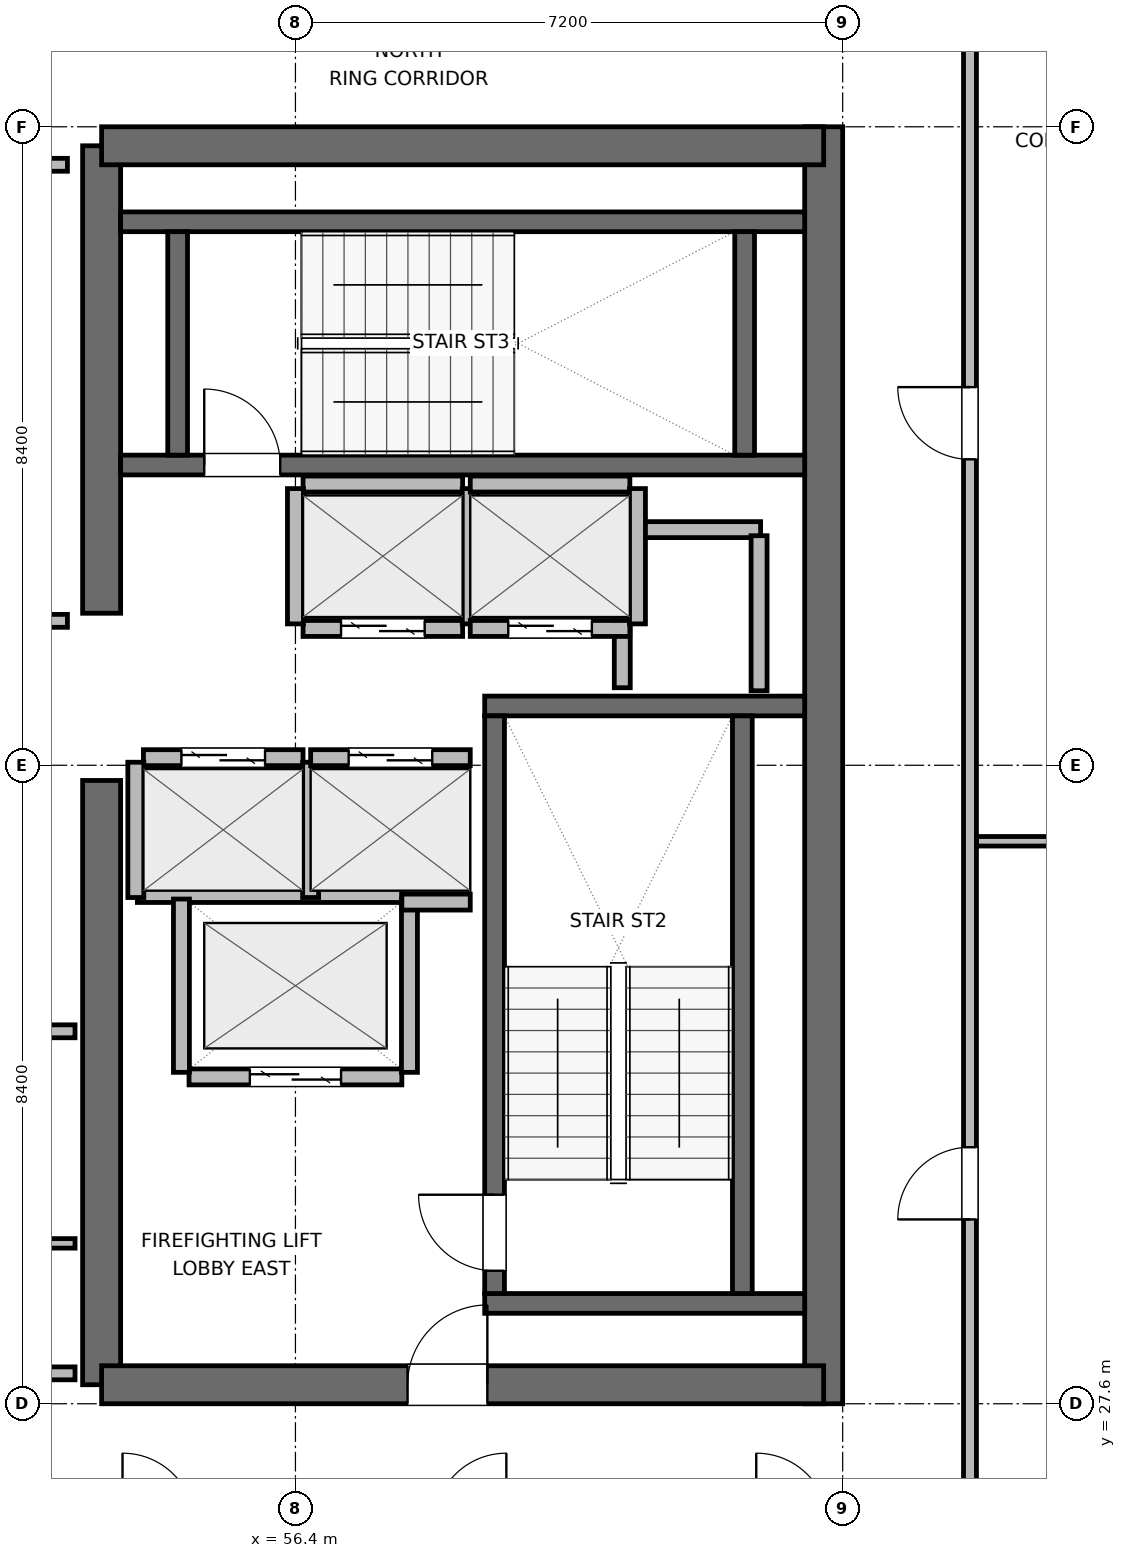
"""IFC4 building model, lengths in metres.
Left out: names, types, materials, properties, quantities, classifications, styles, units other than length and angle.
Written with IfcOpenShell. Run it as: python <this file> out.ifc"""

import sys

from ifc_helpers import new_model, si_unit, direction, frame, frame_2d, origin, place, context, subcontext, project, spatial, rectangle, extrude, element, fill, save


model = new_model("IFC4")
c1 = context("Model", 3, precision=1e-05, world=origin(), true_north=direction((0.0, 1.0)))
c2 = subcontext(c1, "Body", "Model", "MODEL_VIEW")
j1 = project(units=[si_unit("LENGTHUNIT", "METRE"), si_unit("PLANEANGLEUNIT", "RADIAN")], contexts=[c1])
p1 = place(None, origin())
s1 = spatial("IfcSite", under=j1, at=p1, CompositionType="ELEMENT")
p2 = place(p1, origin())
s2 = spatial("IfcBuilding", under=s1, at=p2, CompositionType="ELEMENT")
p3 = place(p2, frame((0.0, 0.0, 314.1)))
s3 = spatial("IfcBuildingStorey", under=s2, at=p3, CompositionType="ELEMENT", Elevation=314.1)
p4 = place(p3, frame((53.85, 27.85, 0.0), z_axis=(0.0, 0.0, 1.0), x_axis=(0.0, 1.0, 0.0)))
e1 = element("IfcWall", 1, at=p4, inside=s3, PredefinedType="SHEAR", context=c2, shape_type="SweptSolid", body=[
    extrude(rectangle(XDim=7.95, YDim=0.5, at=frame_2d((3.975, 0.0))), origin(), (0.0, 0.0, 1.0), 3.9),
])
p5 = place(p3, frame((53.85, 38.0, 0.0), z_axis=(0.0, 0.0, 1.0), x_axis=(0.0, 1.0, 0.0)))
e2 = element("IfcWall", 2, at=p5, inside=s3, PredefinedType="SHEAR", context=c2, shape_type="SweptSolid", body=[
    extrude(rectangle(XDim=6.15, YDim=0.5, at=frame_2d((3.075, 0.0))), origin(), (0.0, 0.0, 1.0), 3.9),
])
p6 = place(p3, frame((63.35, 27.6, 0.0), z_axis=(0.0, 0.0, 1.0), x_axis=(0.0, 1.0, 0.0)))
e3 = element("IfcWall", 3, at=p6, inside=s3, PredefinedType="SHEAR", context=c2, shape_type="SweptSolid", body=[
    extrude(rectangle(XDim=16.8, YDim=0.5, at=frame_2d((8.4, 0.0))), origin(), (0.0, 0.0, 1.0), 3.9),
])
p7 = place(p3, frame((53.85, 27.85, 0.0), z_axis=(0.0, 0.0, 1.0), x_axis=(1.0, 0.0, 0.0)))
e4 = element("IfcWall", 4, at=p7, inside=s3, PredefinedType="SHEAR", context=c2, shape_type="SweptSolid", body=[
    extrude(rectangle(XDim=9.5, YDim=0.5, at=frame_2d((4.75, 0.0))), origin(), (0.0, 0.0, 1.0), 3.9),
])
p8 = place(p7, frame((4.025, 0.0, 0.0)))
e5 = element("IfcOpeningElement", 5, at=p8, cuts=e4, PredefinedType="OPENING", context=c2, shape_type="SweptSolid", body=[
    extrude(rectangle(XDim=1.05, YDim=2.04, at=frame_2d((0.525, 1.02))), frame((0.0, 0.26, 0.0), z_axis=(0.0, -1.0, 0.0), x_axis=(1.0, 0.0, 0.0)), (0.0, 0.0, 1.0), 0.52),
])
p9 = place(p3, frame((53.85, 44.15, 0.0), z_axis=(0.0, 0.0, 1.0), x_axis=(1.0, 0.0, 0.0)))
e6 = element("IfcWall", 6, at=p9, inside=s3, PredefinedType="SHEAR", context=c2, shape_type="SweptSolid", body=[
    extrude(rectangle(XDim=9.5, YDim=0.5, at=frame_2d((4.75, 0.0))), origin(), (0.0, 0.0, 1.0), 3.9),
])
for number, where, z_axis, x_axis in (
    (7, (58.89, 28.92, 0.0), (0.0, 0.0, 1.0), (1.0, 0.0, 0.0)),
    (8, (58.89, 36.78, 0.0), (0.0, 0.0, 1.0), (1.0, 0.0, 0.0)),
):
    element("IfcWall", number, at=place(p3, frame(where, z_axis=z_axis, x_axis=x_axis)), inside=s3, PredefinedType="SHEAR", context=c2, shape_type="SweptSolid", body=[
        extrude(rectangle(XDim=4.21, YDim=0.26, at=frame_2d((2.105, 0.0))), origin(), (0.0, 0.0, 1.0), 3.9),
    ])
p10 = place(p3, frame((59.02, 29.05, 0.0), z_axis=(0.0, 0.0, 1.0), x_axis=(0.0, 1.0, 0.0)))
e9 = element("IfcWall", 9, at=p10, inside=s3, PredefinedType="SHEAR", context=c2, shape_type="SweptSolid", body=[
    extrude(rectangle(XDim=7.6, YDim=0.26, at=frame_2d((3.8, 0.0))), origin(), (0.0, 0.0, 1.0), 3.9),
])
p11 = place(p10, frame((0.3, 0.0, 0.0)))
e10 = element("IfcOpeningElement", 10, at=p11, cuts=e9, PredefinedType="OPENING", context=c2, shape_type="SweptSolid", body=[
    extrude(rectangle(XDim=1.0, YDim=2.04, at=frame_2d((0.5, 1.02))), frame((0.0, 0.14, 0.0), z_axis=(0.0, -1.0, 0.0), x_axis=(1.0, 0.0, 0.0)), (0.0, 0.0, 1.0), 0.28),
])
p12 = place(p3, frame((62.28, 29.05, 0.0), z_axis=(0.0, 0.0, 1.0), x_axis=(0.0, 1.0, 0.0)))
e11 = element("IfcWall", 11, at=p12, inside=s3, PredefinedType="SHEAR", context=c2, shape_type="SweptSolid", body=[
    extrude(rectangle(XDim=7.6, YDim=0.26, at=frame_2d((3.8, 0.0))), origin(), (0.0, 0.0, 1.0), 3.9),
])
p13 = place(p3, frame((54.1, 39.95, 0.0), z_axis=(0.0, 0.0, 1.0), x_axis=(1.0, 0.0, 0.0)))
e12 = element("IfcWall", 12, at=p13, inside=s3, PredefinedType="SHEAR", context=c2, shape_type="SweptSolid", body=[
    extrude(rectangle(XDim=9.0, YDim=0.26, at=frame_2d((4.5, 0.0))), origin(), (0.0, 0.0, 1.0), 3.9),
])
p14 = place(p13, frame((1.1, 0.0, 0.0)))
e13 = element("IfcOpeningElement", 13, at=p14, cuts=e12, PredefinedType="OPENING", context=c2, shape_type="SweptSolid", body=[
    extrude(rectangle(XDim=1.0, YDim=2.04, at=frame_2d((0.5, 1.02))), frame((0.0, 0.14, 0.0), z_axis=(0.0, -1.0, 0.0), x_axis=(1.0, 0.0, 0.0)), (0.0, 0.0, 1.0), 0.28),
])
p15 = place(p3, frame((54.1, 43.15, 0.0), z_axis=(0.0, 0.0, 1.0), x_axis=(1.0, 0.0, 0.0)))
e14 = element("IfcWall", 14, at=p15, inside=s3, PredefinedType="SHEAR", context=c2, shape_type="SweptSolid", body=[
    extrude(rectangle(XDim=9.0, YDim=0.26, at=frame_2d((4.5, 0.0))), origin(), (0.0, 0.0, 1.0), 3.9),
])
for number, where, z_axis, x_axis in (
    (15, (54.85, 40.08, 0.0), (0.0, 0.0, 1.0), (0.0, 1.0, 0.0)),
    (16, (62.31, 40.08, 0.0), (0.0, 0.0, 1.0), (0.0, 1.0, 0.0)),
):
    element("IfcWall", number, at=place(p3, frame(where, z_axis=z_axis, x_axis=x_axis)), inside=s3, PredefinedType="SHEAR", context=c2, shape_type="SweptSolid", body=[
        extrude(rectangle(XDim=2.94, YDim=0.26, at=frame_2d((1.47, 0.0))), origin(), (0.0, 0.0, 1.0), 3.9),
    ])
p16 = place(p3, frame((60.72, 39.1, 0.0), z_axis=(0.0, 0.0, 1.0), x_axis=(1.0, 0.0, 0.0)))
e17 = element("IfcWall", 17, at=p16, inside=s3, PredefinedType="PARTITIONING", context=c2, shape_type="SweptSolid", body=[
    extrude(rectangle(XDim=1.8, YDim=0.21, at=frame_2d((0.9, 0.0))), origin(), (0.0, 0.0, 1.0), 3.68),
])
p17 = place(p3, frame((60.7, 37.02, 0.0), z_axis=(0.0, 0.0, 1.0), x_axis=(0.0, 1.0, 0.0)))
e18 = element("IfcWall", 18, at=p17, inside=s3, PredefinedType="PARTITIONING", context=c2, shape_type="SweptSolid", body=[
    extrude(rectangle(XDim=1.96, YDim=0.21, at=frame_2d((0.98, 0.0))), origin(), (0.0, 0.0, 1.0), 3.68),
])
p18 = place(p3, frame((62.5, 36.98, 0.0), z_axis=(0.0, 0.0, 1.0), x_axis=(0.0, 1.0, 0.0)))
e19 = element("IfcWall", 19, at=p18, inside=s3, PredefinedType="PARTITIONING", context=c2, shape_type="SweptSolid", body=[
    extrude(rectangle(XDim=2.04, YDim=0.21, at=frame_2d((1.02, 0.0))), origin(), (0.0, 0.0, 1.0), 3.68),
])
p19 = place(p3, frame((55.0, 31.9, 0.0), z_axis=(0.0, 0.0, 1.0), x_axis=(1.0, 0.0, 0.0)))
e20 = element("IfcWall", 20, at=p19, inside=s3, PredefinedType="PARTITIONING", context=c2, shape_type="SweptSolid", body=[
    extrude(rectangle(XDim=2.8, YDim=0.21, at=frame_2d((1.4, 0.0))), origin(), (0.0, 0.0, 1.0), 3.68),
])
p20 = place(p19, frame((0.8, 0.0, 0.0)))
e21 = element("IfcOpeningElement", 21, at=p20, cuts=e20, PredefinedType="OPENING", context=c2, shape_type="SweptSolid", body=[
    extrude(rectangle(XDim=1.2, YDim=2.04, at=frame_2d((0.6, 1.02))), frame((0.0, 0.115, 0.0), z_axis=(0.0, -1.0, 0.0), x_axis=(1.0, 0.0, 0.0)), (0.0, 0.0, 1.0), 0.23),
])
p21 = place(p3, frame((54.32, 34.3, 0.0), z_axis=(0.0, 0.0, 1.0), x_axis=(1.0, 0.0, 0.0)))
e22 = element("IfcWall", 22, at=p21, inside=s3, PredefinedType="PARTITIONING", context=c2, shape_type="SweptSolid", body=[
    extrude(rectangle(XDim=3.48, YDim=0.21, at=frame_2d((1.74, 0.0))), origin(), (0.0, 0.0, 1.0), 3.68),
])
for number, where, z_axis, x_axis in (
    (23, (54.9, 31.96, 0.0), (0.0, 0.0, 1.0), (0.0, 1.0, 0.0)),
    (24, (57.9, 31.96, 0.0), (0.0, 0.0, 1.0), (0.0, 1.0, 0.0)),
):
    element("IfcWall", number, at=place(p3, frame(where, z_axis=z_axis, x_axis=x_axis)), inside=s3, PredefinedType="PARTITIONING", context=c2, shape_type="SweptSolid", body=[
        extrude(rectangle(XDim=2.28, YDim=0.21, at=frame_2d((1.14, 0.0))), origin(), (0.0, 0.0, 1.0), 3.68),
    ])
p22 = place(p3, frame((54.4, 36.1, 0.0), z_axis=(0.0, 0.0, 1.0), x_axis=(1.0, 0.0, 0.0)))
e25 = element("IfcWall", 25, at=p22, inside=s3, PredefinedType="PARTITIONING", context=c2, shape_type="SweptSolid", body=[
    extrude(rectangle(XDim=2.1, YDim=0.21, at=frame_2d((1.05, 0.0))), origin(), (0.0, 0.0, 1.0), 3.68),
])
p23 = place(p22, frame((0.5, 0.0, 0.0)))
e26 = element("IfcOpeningElement", 26, at=p23, cuts=e25, PredefinedType="OPENING", context=c2, shape_type="SweptSolid", body=[
    extrude(rectangle(XDim=1.1, YDim=2.04, at=frame_2d((0.55, 1.02))), frame((0.0, 0.115, 0.0), z_axis=(0.0, -1.0, 0.0), x_axis=(1.0, 0.0, 0.0)), (0.0, 0.0, 1.0), 0.23),
])
for number, where, z_axis, x_axis in (
    (27, (54.3, 34.26, 0.0), (0.0, 0.0, 1.0), (0.0, 1.0, 0.0)),
    (28, (56.6, 34.26, 0.0), (0.0, 0.0, 1.0), (0.0, 1.0, 0.0)),
):
    element("IfcWall", number, at=place(p3, frame(where, z_axis=z_axis, x_axis=x_axis)), inside=s3, PredefinedType="PARTITIONING", context=c2, shape_type="SweptSolid", body=[
        extrude(rectangle(XDim=1.78, YDim=0.21, at=frame_2d((0.89, 0.0))), origin(), (0.0, 0.0, 1.0), 3.68),
    ])
p24 = place(p3, frame((56.6, 36.1, 0.0), z_axis=(0.0, 0.0, 1.0), x_axis=(1.0, 0.0, 0.0)))
e29 = element("IfcWall", 29, at=p24, inside=s3, PredefinedType="PARTITIONING", context=c2, shape_type="SweptSolid", body=[
    extrude(rectangle(XDim=2.1, YDim=0.21, at=frame_2d((1.05, 0.0))), origin(), (0.0, 0.0, 1.0), 3.68),
])
p25 = place(p24, frame((0.5, 0.0, 0.0)))
e30 = element("IfcOpeningElement", 30, at=p25, cuts=e29, PredefinedType="OPENING", context=c2, shape_type="SweptSolid", body=[
    extrude(rectangle(XDim=1.1, YDim=2.04, at=frame_2d((0.55, 1.02))), frame((0.0, 0.115, 0.0), z_axis=(0.0, -1.0, 0.0), x_axis=(1.0, 0.0, 0.0)), (0.0, 0.0, 1.0), 0.23),
])
p26 = place(p3, frame((57.8, 34.2, 0.0), z_axis=(0.0, 0.0, 1.0), x_axis=(1.0, 0.0, 0.0)))
e31 = element("IfcWall", 31, at=p26, inside=s3, PredefinedType="PARTITIONING", context=c2, shape_type="SweptSolid", body=[
    extrude(rectangle(XDim=0.9, YDim=0.21, at=frame_2d((0.45, 0.0))), origin(), (0.0, 0.0, 1.0), 3.68),
])
p27 = place(p3, frame((56.5, 37.8, 0.0), z_axis=(0.0, 0.0, 1.0), x_axis=(1.0, 0.0, 0.0)))
e32 = element("IfcWall", 32, at=p27, inside=s3, PredefinedType="PARTITIONING", context=c2, shape_type="SweptSolid", body=[
    extrude(rectangle(XDim=2.1, YDim=0.21, at=frame_2d((1.05, 0.0))), origin(), (0.0, 0.0, 1.0), 3.68),
])
p28 = place(p27, frame((0.5, 0.0, 0.0)))
e33 = element("IfcOpeningElement", 33, at=p28, cuts=e32, PredefinedType="OPENING", context=c2, shape_type="SweptSolid", body=[
    extrude(rectangle(XDim=1.1, YDim=2.04, at=frame_2d((0.55, 1.02))), frame((0.0, 0.115, 0.0), z_axis=(0.0, -1.0, 0.0), x_axis=(1.0, 0.0, 0.0)), (0.0, 0.0, 1.0), 0.23),
])
p29 = place(p3, frame((56.5, 39.7, 0.0), z_axis=(0.0, 0.0, 1.0), x_axis=(1.0, 0.0, 0.0)))
e34 = element("IfcWall", 34, at=p29, inside=s3, PredefinedType="PARTITIONING", context=c2, shape_type="SweptSolid", body=[
    extrude(rectangle(XDim=2.1, YDim=0.21, at=frame_2d((1.05, 0.0))), origin(), (0.0, 0.0, 1.0), 3.68),
])
for number, where, z_axis, x_axis in (
    (35, (56.4, 37.86, 0.0), (0.0, 0.0, 1.0), (0.0, 1.0, 0.0)),
    (36, (58.7, 37.86, 0.0), (0.0, 0.0, 1.0), (0.0, 1.0, 0.0)),
):
    element("IfcWall", number, at=place(p3, frame(where, z_axis=z_axis, x_axis=x_axis)), inside=s3, PredefinedType="PARTITIONING", context=c2, shape_type="SweptSolid", body=[
        extrude(rectangle(XDim=1.78, YDim=0.21, at=frame_2d((0.89, 0.0))), origin(), (0.0, 0.0, 1.0), 3.68),
    ])
p30 = place(p3, frame((58.7, 37.8, 0.0), z_axis=(0.0, 0.0, 1.0), x_axis=(1.0, 0.0, 0.0)))
e37 = element("IfcWall", 37, at=p30, inside=s3, PredefinedType="PARTITIONING", context=c2, shape_type="SweptSolid", body=[
    extrude(rectangle(XDim=2.1, YDim=0.21, at=frame_2d((1.05, 0.0))), origin(), (0.0, 0.0, 1.0), 3.68),
])
p31 = place(p30, frame((0.5, 0.0, 0.0)))
e38 = element("IfcOpeningElement", 38, at=p31, cuts=e37, PredefinedType="OPENING", context=c2, shape_type="SweptSolid", body=[
    extrude(rectangle(XDim=1.1, YDim=2.04, at=frame_2d((0.55, 1.02))), frame((0.0, 0.115, 0.0), z_axis=(0.0, -1.0, 0.0), x_axis=(1.0, 0.0, 0.0)), (0.0, 0.0, 1.0), 0.23),
])
p32 = place(p3, frame((58.7, 39.7, 0.0), z_axis=(0.0, 0.0, 1.0), x_axis=(1.0, 0.0, 0.0)))
e39 = element("IfcWall", 39, at=p32, inside=s3, PredefinedType="PARTITIONING", context=c2, shape_type="SweptSolid", body=[
    extrude(rectangle(XDim=2.1, YDim=0.21, at=frame_2d((1.05, 0.0))), origin(), (0.0, 0.0, 1.0), 3.68),
])
p33 = place(p3, frame((60.9, 37.86, 0.0), z_axis=(0.0, 0.0, 1.0), x_axis=(0.0, 1.0, 0.0)))
e40 = element("IfcWall", 40, at=p33, inside=s3, PredefinedType="PARTITIONING", context=c2, shape_type="SweptSolid", body=[
    extrude(rectangle(XDim=1.78, YDim=0.21, at=frame_2d((0.89, 0.0))), origin(), (0.0, 0.0, 1.0), 3.68),
])
p34 = place(p3, frame((49.287, 28.0, 0.0), z_axis=(0.0, 0.0, 1.0), x_axis=(1.0, 0.0, 0.0)))
e41 = element("IfcWall", 41, at=p34, inside=s3, PredefinedType="PARTITIONING", context=c2, shape_type="SweptSolid", body=[
    extrude(rectangle(XDim=4.213, YDim=0.17, at=frame_2d((2.106, 0.0))), origin(), (0.0, 0.0, 1.0), 2.765),
])
p35 = place(p3, frame((52.2, 32.5, 0.0), z_axis=(0.0, 0.0, 1.0), x_axis=(1.0, 0.0, 0.0)))
e42 = element("IfcWall", 42, at=p35, inside=s3, PredefinedType="PARTITIONING", context=c2, shape_type="SweptSolid", body=[
    extrude(rectangle(XDim=1.3, YDim=0.17, at=frame_2d((0.65, 0.0))), origin(), (0.0, 0.0, 1.0), 3.68),
])
p36 = place(p3, frame((49.287, 29.71, 0.0), z_axis=(0.0, 0.0, 1.0), x_axis=(1.0, 0.0, 0.0)))
e43 = element("IfcWall", 43, at=p36, inside=s3, PredefinedType="PARTITIONING", context=c2, shape_type="SweptSolid", body=[
    extrude(rectangle(XDim=4.213, YDim=0.125, at=frame_2d((2.106, 0.0))), origin(), (0.0, 0.0, 1.0), 3.68),
])
p37 = place(p3, frame((49.287, 37.9, 0.0), z_axis=(0.0, 0.0, 1.0), x_axis=(1.0, 0.0, 0.0)))
e44 = element("IfcWall", 44, at=p37, inside=s3, PredefinedType="PARTITIONING", context=c2, shape_type="SweptSolid", body=[
    extrude(rectangle(XDim=4.113, YDim=0.17, at=frame_2d((2.056, 0.0))), origin(), (0.0, 0.0, 1.0), 3.68),
])
p38 = place(p3, frame((49.287, 43.9, 0.0), z_axis=(0.0, 0.0, 1.0), x_axis=(1.0, 0.0, 0.0)))
e45 = element("IfcWall", 45, at=p38, inside=s3, PredefinedType="PARTITIONING", context=c2, shape_type="SweptSolid", body=[
    extrude(rectangle(XDim=4.113, YDim=0.17, at=frame_2d((2.056, 0.0))), origin(), (0.0, 0.0, 1.0), 2.765),
])
p39 = place(p3, frame((65.275, 26.087, 0.0), z_axis=(0.0, 0.0, 1.0), x_axis=(0.0, 1.0, 0.0)))
e46 = element("IfcWall", 46, at=p39, inside=s3, PredefinedType="PARTITIONING", context=c2, shape_type="SweptSolid", body=[
    extrude(rectangle(XDim=19.826, YDim=0.17, at=frame_2d((9.913, 0.0))), origin(), (0.0, 0.0, 1.0), 3.68),
])
p40 = place(p39, frame((3.938, 0.0, 0.0)))
e47 = element("IfcOpeningElement", 47, at=p40, cuts=e46, PredefinedType="OPENING", context=c2, shape_type="SweptSolid", body=[
    extrude(rectangle(XDim=0.95, YDim=2.04, at=frame_2d((0.475, 1.02))), frame((0.0, 0.095, 0.0), z_axis=(0.0, -1.0, 0.0), x_axis=(1.0, 0.0, 0.0)), (0.0, 0.0, 1.0), 0.19),
])
p41 = place(p39, frame((13.938, 0.0, 0.0)))
e48 = element("IfcOpeningElement", 48, at=p41, cuts=e46, PredefinedType="OPENING", context=c2, shape_type="SweptSolid", body=[
    extrude(rectangle(XDim=0.95, YDim=2.04, at=frame_2d((0.475, 1.02))), frame((0.0, 0.095, 0.0), z_axis=(0.0, -1.0, 0.0), x_axis=(1.0, 0.0, 0.0)), (0.0, 0.0, 1.0), 0.19),
])
p42 = place(p3, frame((65.362, 35.0, 0.0), z_axis=(0.0, 0.0, 1.0), x_axis=(1.0, 0.0, 0.0)))
e49 = element("IfcWall", 49, at=p42, inside=s3, PredefinedType="PARTITIONING", context=c2, shape_type="SweptSolid", body=[
    extrude(rectangle(XDim=5.163, YDim=0.125, at=frame_2d((2.582, 0.0))), origin(), (0.0, 0.0, 1.0), 3.68),
])
p43 = place(p11, origin())
e50 = element("IfcDoor", 50, at=p43, inside=s3, OperationType="SINGLE_SWING_RIGHT", PredefinedType="DOOR", context=c2, shape_type="SweptSolid", body=[
    extrude(rectangle(XDim=1.0, YDim=2.04, at=frame_2d((0.5, 1.02))), frame((0.0, 0.025, 0.0), z_axis=(0.0, -1.0, 0.0), x_axis=(1.0, 0.0, 0.0)), (0.0, 0.0, 1.0), 0.05),
])
fill(e10, e50)
p44 = place(p14, origin())
e51 = element("IfcDoor", 51, at=p44, inside=s3, OperationType="SINGLE_SWING_LEFT", PredefinedType="DOOR", context=c2, shape_type="SweptSolid", body=[
    extrude(rectangle(XDim=1.0, YDim=2.04, at=frame_2d((0.5, 1.02))), frame((0.0, 0.025, 0.0), z_axis=(0.0, -1.0, 0.0), x_axis=(1.0, 0.0, 0.0)), (0.0, 0.0, 1.0), 0.05),
])
fill(e13, e51)
p45 = place(p20, origin())
e52 = element("IfcDoor", 52, at=p45, inside=s3, OperationType="DOUBLE_DOOR_SLIDING", PredefinedType="DOOR", context=c2, shape_type="SweptSolid", body=[
    extrude(rectangle(XDim=1.2, YDim=2.04, at=frame_2d((0.6, 1.02))), frame((0.0, 0.025, 0.0), z_axis=(0.0, -1.0, 0.0), x_axis=(1.0, 0.0, 0.0)), (0.0, 0.0, 1.0), 0.05),
])
fill(e21, e52)
p46 = place(p23, origin())
e53 = element("IfcDoor", 53, at=p46, inside=s3, OperationType="DOUBLE_DOOR_SLIDING", PredefinedType="DOOR", context=c2, shape_type="SweptSolid", body=[
    extrude(rectangle(XDim=1.1, YDim=2.04, at=frame_2d((0.55, 1.02))), frame((0.0, 0.025, 0.0), z_axis=(0.0, -1.0, 0.0), x_axis=(1.0, 0.0, 0.0)), (0.0, 0.0, 1.0), 0.05),
])
fill(e26, e53)
p47 = place(p25, origin())
e54 = element("IfcDoor", 54, at=p47, inside=s3, OperationType="DOUBLE_DOOR_SLIDING", PredefinedType="DOOR", context=c2, shape_type="SweptSolid", body=[
    extrude(rectangle(XDim=1.1, YDim=2.04, at=frame_2d((0.55, 1.02))), frame((0.0, 0.025, 0.0), z_axis=(0.0, -1.0, 0.0), x_axis=(1.0, 0.0, 0.0)), (0.0, 0.0, 1.0), 0.05),
])
fill(e30, e54)
p48 = place(p28, origin())
e55 = element("IfcDoor", 55, at=p48, inside=s3, OperationType="DOUBLE_DOOR_SLIDING", PredefinedType="DOOR", context=c2, shape_type="SweptSolid", body=[
    extrude(rectangle(XDim=1.1, YDim=2.04, at=frame_2d((0.55, 1.02))), frame((0.0, 0.025, 0.0), z_axis=(0.0, -1.0, 0.0), x_axis=(1.0, 0.0, 0.0)), (0.0, 0.0, 1.0), 0.05),
])
fill(e33, e55)
p49 = place(p31, origin())
e56 = element("IfcDoor", 56, at=p49, inside=s3, OperationType="DOUBLE_DOOR_SLIDING", PredefinedType="DOOR", context=c2, shape_type="SweptSolid", body=[
    extrude(rectangle(XDim=1.1, YDim=2.04, at=frame_2d((0.55, 1.02))), frame((0.0, 0.025, 0.0), z_axis=(0.0, -1.0, 0.0), x_axis=(1.0, 0.0, 0.0)), (0.0, 0.0, 1.0), 0.05),
])
fill(e38, e56)
p50 = place(p8, origin())
e57 = element("IfcDoor", 57, at=p50, inside=s3, OperationType="SINGLE_SWING_RIGHT", PredefinedType="DOOR", context=c2, shape_type="SweptSolid", body=[
    extrude(rectangle(XDim=1.05, YDim=2.04, at=frame_2d((0.525, 1.02))), frame((0.0, 0.025, 0.0), z_axis=(0.0, -1.0, 0.0), x_axis=(1.0, 0.0, 0.0)), (0.0, 0.0, 1.0), 0.05),
])
fill(e5, e57)
p51 = place(p40, origin())
e58 = element("IfcDoor", 58, at=p51, inside=s3, OperationType="SINGLE_SWING_LEFT", PredefinedType="DOOR", context=c2, shape_type="SweptSolid", body=[
    extrude(rectangle(XDim=0.95, YDim=2.04, at=frame_2d((0.475, 1.02))), frame((0.0, 0.025, 0.0), z_axis=(0.0, -1.0, 0.0), x_axis=(1.0, 0.0, 0.0)), (0.0, 0.0, 1.0), 0.05),
])
fill(e47, e58)
p52 = place(p41, origin())
e59 = element("IfcDoor", 59, at=p52, inside=s3, OperationType="SINGLE_SWING_RIGHT", PredefinedType="DOOR", context=c2, shape_type="SweptSolid", body=[
    extrude(rectangle(XDim=0.95, YDim=2.04, at=frame_2d((0.475, 1.02))), frame((0.0, 0.025, 0.0), z_axis=(0.0, -1.0, 0.0), x_axis=(1.0, 0.0, 0.0)), (0.0, 0.0, 1.0), 0.05),
])
fill(e48, e59)
save(model, sys.argv[1])
